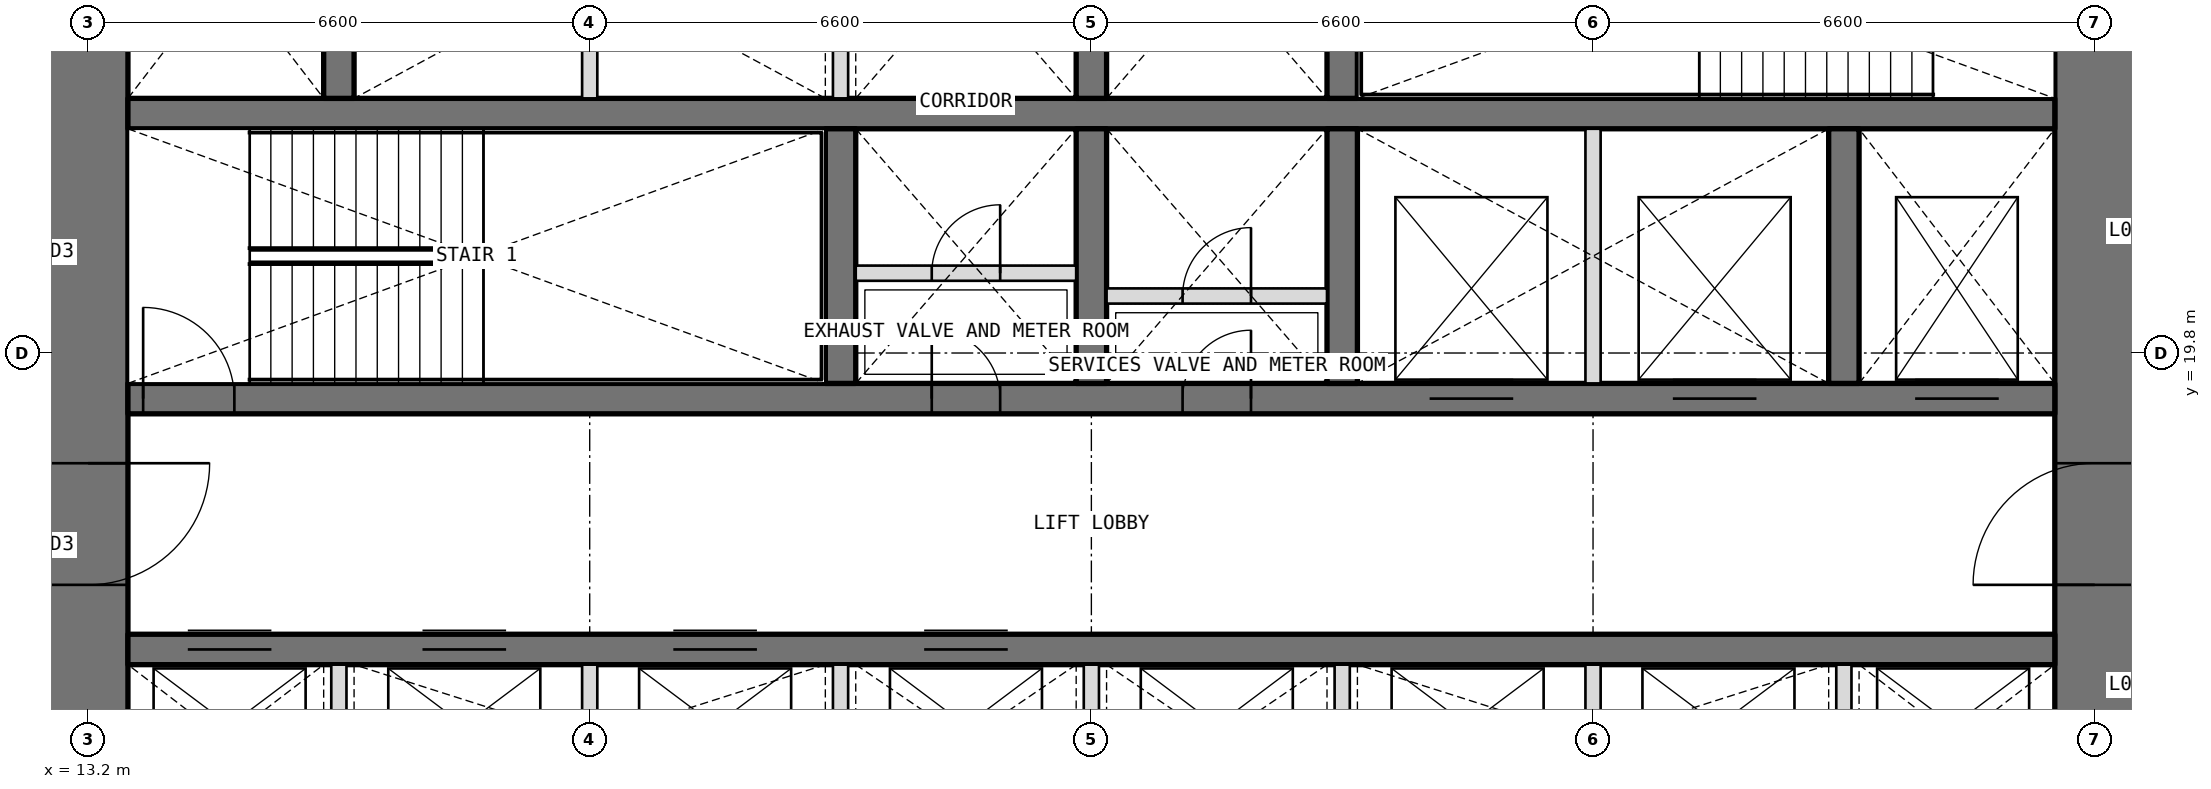
"""IFC4 building model, lengths in metres.
Left out: names, types, materials, properties, quantities, classifications, styles, units other than length and angle.
Written with IfcOpenShell. Run it as: python <this file> out.ifc"""

import sys

from ifc_helpers import new_model, si_unit, direction, frame, frame_2d, origin, place, context, subcontext, project, spatial, rectangle, extrude, element, fill, save


model = new_model("IFC4")
c1 = context("Model", 3, precision=1e-05, world=origin(), true_north=direction((0.0, 1.0)))
c2 = subcontext(c1, "Body", "Model", "MODEL_VIEW")
j1 = project(units=[si_unit("LENGTHUNIT", "METRE"), si_unit("PLANEANGLEUNIT", "RADIAN")], contexts=[c1])
p1 = place(None, origin())
s1 = spatial("IfcSite", under=j1, at=p1, CompositionType="ELEMENT")
p2 = place(p1, origin())
s2 = spatial("IfcBuilding", under=s1, at=p2, CompositionType="ELEMENT")
p3 = place(p2, frame((0.0, 0.0, 42.3)))
s3 = spatial("IfcBuildingStorey", under=s2, at=p3, CompositionType="ELEMENT", Elevation=42.3)
p4 = place(p3, frame((39.6, 13.725, 0.0), z_axis=(0.0, 0.0, 1.0), x_axis=(0.0, 1.0, 0.0)))
e1 = element("IfcWall", 1, at=p4, inside=s3, PredefinedType="SHEAR", context=c2, shape_type="SweptSolid", body=[
    extrude(rectangle(XDim=18.75, YDim=1.05, at=frame_2d((9.375, 0.0))), origin(), (0.0, 0.0, 1.0), 4.2),
])
p5 = place(p4, frame((3.025, 0.0, 0.0)))
e2 = element("IfcOpeningElement", 2, at=p5, cuts=e1, PredefinedType="OPENING", context=c2, shape_type="SweptSolid", body=[
    extrude(rectangle(XDim=1.6, YDim=2.1, at=frame_2d((0.8, 1.05))), frame((0.0, 0.535, 0.0), z_axis=(0.0, -1.0, 0.0), x_axis=(1.0, 0.0, 0.0)), (0.0, 0.0, 1.0), 1.07),
])
p6 = place(p4, frame((13.825, 0.0, 0.0)))
e3 = element("IfcOpeningElement", 3, at=p6, cuts=e1, PredefinedType="OPENING", context=c2, shape_type="SweptSolid", body=[
    extrude(rectangle(XDim=1.6, YDim=2.1, at=frame_2d((0.8, 1.05))), frame((0.0, 0.535, 0.0), z_axis=(0.0, -1.0, 0.0), x_axis=(1.0, 0.0, 0.0)), (0.0, 0.0, 1.0), 1.07),
])
p7 = place(p3, frame((13.2, 32.475, 0.0), z_axis=(0.0, 0.0, 1.0), x_axis=(0.0, -1.0, 0.0)))
e4 = element("IfcWall", 4, at=p7, inside=s3, PredefinedType="SHEAR", context=c2, shape_type="SweptSolid", body=[
    extrude(rectangle(XDim=18.75, YDim=1.05, at=frame_2d((9.375, 0.0))), origin(), (0.0, 0.0, 1.0), 4.2),
])
p8 = place(p7, frame((14.125, 0.0, 0.0)))
e5 = element("IfcOpeningElement", 5, at=p8, cuts=e4, PredefinedType="OPENING", context=c2, shape_type="SweptSolid", body=[
    extrude(rectangle(XDim=1.6, YDim=2.1, at=frame_2d((0.8, 1.05))), frame((0.0, 0.535, 0.0), z_axis=(0.0, -1.0, 0.0), x_axis=(1.0, 0.0, 0.0)), (0.0, 0.0, 1.0), 1.07),
])
p9 = place(p7, frame((3.325, 0.0, 0.0)))
e6 = element("IfcOpeningElement", 6, at=p9, cuts=e4, PredefinedType="OPENING", context=c2, shape_type="SweptSolid", body=[
    extrude(rectangle(XDim=1.6, YDim=2.1, at=frame_2d((0.8, 1.05))), frame((0.0, 0.535, 0.0), z_axis=(0.0, -1.0, 0.0), x_axis=(1.0, 0.0, 0.0)), (0.0, 0.0, 1.0), 1.07),
])
p10 = place(p3, frame((13.725, 15.9, 0.0), z_axis=(0.0, 0.0, 1.0), x_axis=(1.0, 0.0, 0.0)))
e7 = element("IfcWall", 7, at=p10, inside=s3, PredefinedType="SHEAR", context=c2, shape_type="SweptSolid", body=[
    extrude(rectangle(XDim=25.35, YDim=0.4, at=frame_2d((12.675, 0.0))), origin(), (0.0, 0.0, 1.0), 4.2),
])
p11 = place(p10, frame((0.788, 0.0, 0.0)))
e8 = element("IfcOpeningElement", 8, at=p11, cuts=e7, PredefinedType="OPENING", context=c2, shape_type="SweptSolid", body=[
    extrude(rectangle(XDim=1.1, YDim=2.1, at=frame_2d((0.55, 1.05))), frame((0.0, 0.21, 0.0), z_axis=(0.0, -1.0, 0.0), x_axis=(1.0, 0.0, 0.0)), (0.0, 0.0, 1.0), 0.42),
])
p12 = place(p10, frame((3.875, 0.0, 0.0)))
e9 = element("IfcOpeningElement", 9, at=p12, cuts=e7, PredefinedType="OPENING", context=c2, shape_type="SweptSolid", body=[
    extrude(rectangle(XDim=1.1, YDim=2.1, at=frame_2d((0.55, 1.05))), frame((0.0, 0.21, 0.0), z_axis=(0.0, -1.0, 0.0), x_axis=(1.0, 0.0, 0.0)), (0.0, 0.0, 1.0), 0.42),
])
p13 = place(p10, frame((7.175, 0.0, 0.0)))
e10 = element("IfcOpeningElement", 10, at=p13, cuts=e7, PredefinedType="OPENING", context=c2, shape_type="SweptSolid", body=[
    extrude(rectangle(XDim=1.1, YDim=2.1, at=frame_2d((0.55, 1.05))), frame((0.0, 0.21, 0.0), z_axis=(0.0, -1.0, 0.0), x_axis=(1.0, 0.0, 0.0)), (0.0, 0.0, 1.0), 0.42),
])
p14 = place(p10, frame((10.475, 0.0, 0.0)))
e11 = element("IfcOpeningElement", 11, at=p14, cuts=e7, PredefinedType="OPENING", context=c2, shape_type="SweptSolid", body=[
    extrude(rectangle(XDim=1.1, YDim=2.1, at=frame_2d((0.55, 1.05))), frame((0.0, 0.21, 0.0), z_axis=(0.0, -1.0, 0.0), x_axis=(1.0, 0.0, 0.0)), (0.0, 0.0, 1.0), 0.42),
])
p15 = place(p3, frame((13.725, 19.2, 0.0), z_axis=(0.0, 0.0, 1.0), x_axis=(1.0, 0.0, 0.0)))
e12 = element("IfcWall", 12, at=p15, inside=s3, PredefinedType="SHEAR", context=c2, shape_type="SweptSolid", body=[
    extrude(rectangle(XDim=25.35, YDim=0.4, at=frame_2d((12.675, 0.0))), origin(), (0.0, 0.0, 1.0), 4.2),
])
p16 = place(p15, frame((10.575, 0.0, 0.0)))
e13 = element("IfcOpeningElement", 13, at=p16, cuts=e12, PredefinedType="OPENING", context=c2, shape_type="SweptSolid", body=[
    extrude(rectangle(XDim=0.9, YDim=2.1, at=frame_2d((0.45, 1.05))), frame((0.0, 0.21, 0.0), z_axis=(0.0, -1.0, 0.0), x_axis=(1.0, 0.0, 0.0)), (0.0, 0.0, 1.0), 0.42),
])
p17 = place(p15, frame((13.875, 0.0, 0.0)))
e14 = element("IfcOpeningElement", 14, at=p17, cuts=e12, PredefinedType="OPENING", context=c2, shape_type="SweptSolid", body=[
    extrude(rectangle(XDim=0.9, YDim=2.1, at=frame_2d((0.45, 1.05))), frame((0.0, 0.21, 0.0), z_axis=(0.0, -1.0, 0.0), x_axis=(1.0, 0.0, 0.0)), (0.0, 0.0, 1.0), 0.42),
])
p18 = place(p15, frame((0.2, 0.0, 0.0)))
e15 = element("IfcOpeningElement", 15, at=p18, cuts=e12, PredefinedType="OPENING", context=c2, shape_type="SweptSolid", body=[
    extrude(rectangle(XDim=1.2, YDim=2.1, at=frame_2d((0.6, 1.05))), frame((0.0, 0.21, 0.0), z_axis=(0.0, -1.0, 0.0), x_axis=(1.0, 0.0, 0.0)), (0.0, 0.0, 1.0), 0.42),
])
p19 = place(p15, frame((23.512, 0.0, 0.0)))
e16 = element("IfcOpeningElement", 16, at=p19, cuts=e12, PredefinedType="OPENING", context=c2, shape_type="SweptSolid", body=[
    extrude(rectangle(XDim=1.1, YDim=2.1, at=frame_2d((0.55, 1.05))), frame((0.0, 0.21, 0.0), z_axis=(0.0, -1.0, 0.0), x_axis=(1.0, 0.0, 0.0)), (0.0, 0.0, 1.0), 0.42),
])
p20 = place(p15, frame((17.125, 0.0, 0.0)))
e17 = element("IfcOpeningElement", 17, at=p20, cuts=e12, PredefinedType="OPENING", context=c2, shape_type="SweptSolid", body=[
    extrude(rectangle(XDim=1.1, YDim=2.1, at=frame_2d((0.55, 1.05))), frame((0.0, 0.21, 0.0), z_axis=(0.0, -1.0, 0.0), x_axis=(1.0, 0.0, 0.0)), (0.0, 0.0, 1.0), 0.42),
])
p21 = place(p15, frame((20.325, 0.0, 0.0)))
e18 = element("IfcOpeningElement", 18, at=p21, cuts=e12, PredefinedType="OPENING", context=c2, shape_type="SweptSolid", body=[
    extrude(rectangle(XDim=1.1, YDim=2.1, at=frame_2d((0.55, 1.05))), frame((0.0, 0.21, 0.0), z_axis=(0.0, -1.0, 0.0), x_axis=(1.0, 0.0, 0.0)), (0.0, 0.0, 1.0), 0.42),
])
p22 = place(p3, frame((13.725, 22.95, 0.0), z_axis=(0.0, 0.0, 1.0), x_axis=(1.0, 0.0, 0.0)))
e19 = element("IfcWall", 19, at=p22, inside=s3, PredefinedType="SHEAR", context=c2, shape_type="SweptSolid", body=[
    extrude(rectangle(XDim=25.35, YDim=0.4, at=frame_2d((12.675, 0.0))), origin(), (0.0, 0.0, 1.0), 4.2),
])
for number, where, z_axis, x_axis in (
    (20, (23.1, 19.4, 0.0), (0.0, 0.0, 1.0), (0.0, 1.0, 0.0)),
    (21, (26.4, 19.4, 0.0), (0.0, 0.0, 1.0), (0.0, 1.0, 0.0)),
    (22, (29.7, 19.4, 0.0), (0.0, 0.0, 1.0), (0.0, 1.0, 0.0)),
    (23, (36.3, 19.4, 0.0), (0.0, 0.0, 1.0), (0.0, 1.0, 0.0)),
    (24, (16.5, 23.15, 0.0), (0.0, 0.0, 1.0), (0.0, 1.0, 0.0)),
    (25, (26.4, 23.15, 0.0), (0.0, 0.0, 1.0), (0.0, 1.0, 0.0)),
    (26, (29.7, 23.15, 0.0), (0.0, 0.0, 1.0), (0.0, 1.0, 0.0)),
):
    element("IfcWall", number, at=place(p3, frame(where, z_axis=z_axis, x_axis=x_axis)), inside=s3, PredefinedType="SHEAR", context=c2, shape_type="SweptSolid", body=[
        extrude(rectangle(XDim=3.35, YDim=0.4, at=frame_2d((1.675, 0.0))), origin(), (0.0, 0.0, 1.0), 4.2),
    ])
for number, where, z_axis, x_axis in (
    (27, (16.5, 13.725, 0.0), (0.0, 0.0, 1.0), (0.0, 1.0, 0.0)),
    (28, (19.8, 13.725, 0.0), (0.0, 0.0, 1.0), (0.0, 1.0, 0.0)),
    (29, (23.1, 13.725, 0.0), (0.0, 0.0, 1.0), (0.0, 1.0, 0.0)),
    (30, (26.4, 13.725, 0.0), (0.0, 0.0, 1.0), (0.0, 1.0, 0.0)),
    (31, (29.7, 13.725, 0.0), (0.0, 0.0, 1.0), (0.0, 1.0, 0.0)),
    (32, (33.0, 13.725, 0.0), (0.0, 0.0, 1.0), (0.0, 1.0, 0.0)),
    (33, (36.3, 13.725, 0.0), (0.0, 0.0, 1.0), (0.0, 1.0, 0.0)),
):
    element("IfcWall", number, at=place(p3, frame(where, z_axis=z_axis, x_axis=x_axis)), inside=s3, PredefinedType="PARTITIONING", context=c2, shape_type="SweptSolid", body=[
        extrude(rectangle(XDim=1.975, YDim=0.2, at=frame_2d((0.987, 0.0))), origin(), (0.0, 0.0, 1.0), 4.2),
    ])
for number, where, z_axis, x_axis in (
    (34, (33.0, 19.4, 0.0), (0.0, 0.0, 1.0), (0.0, 1.0, 0.0)),
    (35, (19.8, 23.15, 0.0), (0.0, 0.0, 1.0), (0.0, 1.0, 0.0)),
    (36, (23.1, 23.15, 0.0), (0.0, 0.0, 1.0), (0.0, 1.0, 0.0)),
):
    element("IfcWall", number, at=place(p3, frame(where, z_axis=z_axis, x_axis=x_axis)), inside=s3, PredefinedType="PARTITIONING", context=c2, shape_type="SweptSolid", body=[
        extrude(rectangle(XDim=3.35, YDim=0.2, at=frame_2d((1.675, 0.0))), origin(), (0.0, 0.0, 1.0), 4.2),
    ])
p23 = place(p3, frame((23.3, 20.85, 0.0), z_axis=(0.0, 0.0, 1.0), x_axis=(1.0, 0.0, 0.0)))
e37 = element("IfcWall", 37, at=p23, inside=s3, PredefinedType="PARTITIONING", context=c2, shape_type="SweptSolid", body=[
    extrude(rectangle(XDim=2.9, YDim=0.2, at=frame_2d((1.45, 0.0))), origin(), (0.0, 0.0, 1.0), 3.9),
])
p24 = place(p23, frame((1.0, 0.0, 0.0)))
e38 = element("IfcOpeningElement", 38, at=p24, cuts=e37, PredefinedType="OPENING", context=c2, shape_type="SweptSolid", body=[
    extrude(rectangle(XDim=0.9, YDim=2.1, at=frame_2d((0.45, 1.05))), frame((0.0, 0.11, 0.0), z_axis=(0.0, -1.0, 0.0), x_axis=(1.0, 0.0, 0.0)), (0.0, 0.0, 1.0), 0.22),
])
p25 = place(p3, frame((26.6, 20.55, 0.0), z_axis=(0.0, 0.0, 1.0), x_axis=(1.0, 0.0, 0.0)))
e39 = element("IfcWall", 39, at=p25, inside=s3, PredefinedType="PARTITIONING", context=c2, shape_type="SweptSolid", body=[
    extrude(rectangle(XDim=2.9, YDim=0.2, at=frame_2d((1.45, 0.0))), origin(), (0.0, 0.0, 1.0), 3.9),
])
p26 = place(p25, frame((1.0, 0.0, 0.0)))
e40 = element("IfcOpeningElement", 40, at=p26, cuts=e39, PredefinedType="OPENING", context=c2, shape_type="SweptSolid", body=[
    extrude(rectangle(XDim=0.9, YDim=2.1, at=frame_2d((0.45, 1.05))), frame((0.0, 0.11, 0.0), z_axis=(0.0, -1.0, 0.0), x_axis=(1.0, 0.0, 0.0)), (0.0, 0.0, 1.0), 0.22),
])
p27 = place(p16, origin())
e41 = element("IfcDoor", 41, at=p27, inside=s3, OperationType="SINGLE_SWING_LEFT", PredefinedType="DOOR", context=c2, shape_type="SweptSolid", body=[
    extrude(rectangle(XDim=0.9, YDim=2.1, at=frame_2d((0.45, 1.05))), frame((0.0, 0.025, 0.0), z_axis=(0.0, -1.0, 0.0), x_axis=(1.0, 0.0, 0.0)), (0.0, 0.0, 1.0), 0.05),
])
fill(e13, e41)
p28 = place(p24, origin())
e42 = element("IfcDoor", 42, at=p28, inside=s3, OperationType="SINGLE_SWING_RIGHT", PredefinedType="DOOR", context=c2, shape_type="SweptSolid", body=[
    extrude(rectangle(XDim=0.9, YDim=2.1, at=frame_2d((0.45, 1.05))), frame((0.0, 0.025, 0.0), z_axis=(0.0, -1.0, 0.0), x_axis=(1.0, 0.0, 0.0)), (0.0, 0.0, 1.0), 0.05),
])
fill(e38, e42)
p29 = place(p17, origin())
e43 = element("IfcDoor", 43, at=p29, inside=s3, OperationType="SINGLE_SWING_RIGHT", PredefinedType="DOOR", context=c2, shape_type="SweptSolid", body=[
    extrude(rectangle(XDim=0.9, YDim=2.1, at=frame_2d((0.45, 1.05))), frame((0.0, 0.025, 0.0), z_axis=(0.0, -1.0, 0.0), x_axis=(1.0, 0.0, 0.0)), (0.0, 0.0, 1.0), 0.05),
])
fill(e14, e43)
p30 = place(p26, origin())
e44 = element("IfcDoor", 44, at=p30, inside=s3, OperationType="SINGLE_SWING_RIGHT", PredefinedType="DOOR", context=c2, shape_type="SweptSolid", body=[
    extrude(rectangle(XDim=0.9, YDim=2.1, at=frame_2d((0.45, 1.05))), frame((0.0, 0.025, 0.0), z_axis=(0.0, -1.0, 0.0), x_axis=(1.0, 0.0, 0.0)), (0.0, 0.0, 1.0), 0.05),
])
fill(e40, e44)
p31 = place(p18, origin())
e45 = element("IfcDoor", 45, at=p31, inside=s3, OperationType="SINGLE_SWING_LEFT", PredefinedType="DOOR", context=c2, shape_type="SweptSolid", body=[
    extrude(rectangle(XDim=1.2, YDim=2.1, at=frame_2d((0.6, 1.05))), frame((0.0, 0.025, 0.0), z_axis=(0.0, -1.0, 0.0), x_axis=(1.0, 0.0, 0.0)), (0.0, 0.0, 1.0), 0.05),
])
fill(e15, e45)
p32 = place(p8, origin())
e46 = element("IfcDoor", 46, at=p32, inside=s3, OperationType="DOUBLE_DOOR_DOUBLE_SWING", PredefinedType="DOOR", context=c2, shape_type="SweptSolid", body=[
    extrude(rectangle(XDim=1.6, YDim=2.1, at=frame_2d((0.8, 1.05))), frame((0.0, 0.025, 0.0), z_axis=(0.0, -1.0, 0.0), x_axis=(1.0, 0.0, 0.0)), (0.0, 0.0, 1.0), 0.05),
])
fill(e5, e46)
p33 = place(p5, origin())
e47 = element("IfcDoor", 47, at=p33, inside=s3, OperationType="DOUBLE_DOOR_DOUBLE_SWING", PredefinedType="DOOR", context=c2, shape_type="SweptSolid", body=[
    extrude(rectangle(XDim=1.6, YDim=2.1, at=frame_2d((0.8, 1.05))), frame((0.0, 0.025, 0.0), z_axis=(0.0, -1.0, 0.0), x_axis=(1.0, 0.0, 0.0)), (0.0, 0.0, 1.0), 0.05),
])
fill(e2, e47)
p34 = place(p11, origin())
e48 = element("IfcDoor", 48, at=p34, inside=s3, OperationType="DOUBLE_DOOR_SLIDING", PredefinedType="DOOR", context=c2, shape_type="SweptSolid", body=[
    extrude(rectangle(XDim=1.1, YDim=2.1, at=frame_2d((0.55, 1.05))), frame((0.0, 0.025, 0.0), z_axis=(0.0, -1.0, 0.0), x_axis=(1.0, 0.0, 0.0)), (0.0, 0.0, 1.0), 0.05),
])
fill(e8, e48)
p35 = place(p12, origin())
e49 = element("IfcDoor", 49, at=p35, inside=s3, OperationType="DOUBLE_DOOR_SLIDING", PredefinedType="DOOR", context=c2, shape_type="SweptSolid", body=[
    extrude(rectangle(XDim=1.1, YDim=2.1, at=frame_2d((0.55, 1.05))), frame((0.0, 0.025, 0.0), z_axis=(0.0, -1.0, 0.0), x_axis=(1.0, 0.0, 0.0)), (0.0, 0.0, 1.0), 0.05),
])
fill(e9, e49)
p36 = place(p13, origin())
e50 = element("IfcDoor", 50, at=p36, inside=s3, OperationType="DOUBLE_DOOR_SLIDING", PredefinedType="DOOR", context=c2, shape_type="SweptSolid", body=[
    extrude(rectangle(XDim=1.1, YDim=2.1, at=frame_2d((0.55, 1.05))), frame((0.0, 0.025, 0.0), z_axis=(0.0, -1.0, 0.0), x_axis=(1.0, 0.0, 0.0)), (0.0, 0.0, 1.0), 0.05),
])
fill(e10, e50)
p37 = place(p14, origin())
e51 = element("IfcDoor", 51, at=p37, inside=s3, OperationType="DOUBLE_DOOR_SLIDING", PredefinedType="DOOR", context=c2, shape_type="SweptSolid", body=[
    extrude(rectangle(XDim=1.1, YDim=2.1, at=frame_2d((0.55, 1.05))), frame((0.0, 0.025, 0.0), z_axis=(0.0, -1.0, 0.0), x_axis=(1.0, 0.0, 0.0)), (0.0, 0.0, 1.0), 0.05),
])
fill(e11, e51)
p38 = place(p19, origin())
e52 = element("IfcDoor", 52, at=p38, inside=s3, OperationType="DOUBLE_DOOR_SLIDING", PredefinedType="DOOR", context=c2, shape_type="SweptSolid", body=[
    extrude(rectangle(XDim=1.1, YDim=2.1, at=frame_2d((0.55, 1.05))), frame((0.0, 0.025, 0.0), z_axis=(0.0, -1.0, 0.0), x_axis=(1.0, 0.0, 0.0)), (0.0, 0.0, 1.0), 0.05),
])
fill(e16, e52)
p39 = place(p20, origin())
e53 = element("IfcDoor", 53, at=p39, inside=s3, OperationType="DOUBLE_DOOR_SLIDING", PredefinedType="DOOR", context=c2, shape_type="SweptSolid", body=[
    extrude(rectangle(XDim=1.1, YDim=2.1, at=frame_2d((0.55, 1.05))), frame((0.0, 0.025, 0.0), z_axis=(0.0, -1.0, 0.0), x_axis=(1.0, 0.0, 0.0)), (0.0, 0.0, 1.0), 0.05),
])
fill(e17, e53)
p40 = place(p21, origin())
e54 = element("IfcDoor", 54, at=p40, inside=s3, OperationType="DOUBLE_DOOR_SLIDING", PredefinedType="DOOR", context=c2, shape_type="SweptSolid", body=[
    extrude(rectangle(XDim=1.1, YDim=2.1, at=frame_2d((0.55, 1.05))), frame((0.0, 0.025, 0.0), z_axis=(0.0, -1.0, 0.0), x_axis=(1.0, 0.0, 0.0)), (0.0, 0.0, 1.0), 0.05),
])
fill(e18, e54)
save(model, sys.argv[1])
